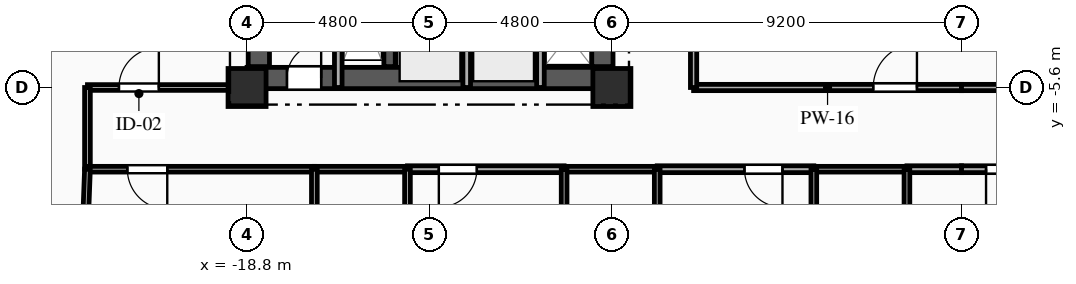
"""IFC4 building model, lengths in metres.
Left out: names, types, materials, properties, quantities, classifications, styles, units other than length and angle.
Written with IfcOpenShell. Run it as: python <this file> out.ifc"""

import sys

from ifc_helpers import new_model, si_unit, direction, frame, frame_2d, origin, origin_2d, place, context, subcontext, project, spatial, rectangle, extrude, element, fill, save


model = new_model("IFC4")
c1 = context("Model", 3, precision=1e-05, world=origin(), true_north=direction((0.0, 1.0)))
c2 = subcontext(c1, "Body", "Model", "MODEL_VIEW")
j1 = project(units=[si_unit("LENGTHUNIT", "METRE"), si_unit("PLANEANGLEUNIT", "RADIAN")], contexts=[c1])
p1 = place(None, origin())
s1 = spatial("IfcSite", under=j1, at=p1, CompositionType="ELEMENT")
p2 = place(p1, origin())
s2 = spatial("IfcBuilding", under=s1, at=p2, CompositionType="ELEMENT")
p3 = place(p2, frame((0.0, 0.0, 115.85)))
s3 = spatial("IfcBuildingStorey", under=s2, at=p3, CompositionType="ELEMENT", Elevation=115.85)
for number, where, z_axis, x_axis in (
    (1, (-18.8, -5.6, 0.0), (0.0, 0.0, 1.0), (1.0, 0.0, 0.0)),
    (2, (-9.2, -5.6, 0.0), (0.0, 0.0, 1.0), (1.0, 0.0, 0.0)),
):
    element("IfcColumn", number, at=place(p3, frame(where, z_axis=z_axis, x_axis=x_axis)), inside=s3, PredefinedType="COLUMN", context=c2, shape_type="SweptSolid", body=[
        extrude(rectangle(XDim=1.0, YDim=1.0, at=origin_2d()), origin(), (0.0, 0.0, 1.0), 3.35),
    ])
p4 = place(p3, frame((-18.8, -5.35, 0.0), z_axis=(0.0, 0.0, 1.0), x_axis=(1.0, 0.0, 0.0)))
e3 = element("IfcWall", 3, at=p4, inside=s3, PredefinedType="SHEAR", context=c2, shape_type="SweptSolid", body=[
    extrude(rectangle(XDim=9.6, YDim=0.56, at=frame_2d((4.8, 0.0))), origin(), (0.0, 0.0, 1.0), 3.045),
])
p5 = place(p4, frame((1.05, 0.0, 0.0)))
e4 = element("IfcOpeningElement", 4, at=p5, cuts=e3, PredefinedType="OPENING", context=c2, shape_type="SweptSolid", body=[
    extrude(rectangle(XDim=0.9, YDim=2.1, at=frame_2d((0.45, 1.05))), frame((0.0, 0.29, 0.0), z_axis=(0.0, -1.0, 0.0), x_axis=(1.0, 0.0, 0.0)), (0.0, 0.0, 1.0), 0.58),
])
p6 = place(p3, frame((-18.49, -5.05, 0.0), z_axis=(0.0, 0.0, 1.0), x_axis=(0.0, 1.0, 0.0)))
e5 = element("IfcWall", 5, at=p6, inside=s3, PredefinedType="SHEAR", context=c2, shape_type="SweptSolid", body=[
    extrude(rectangle(XDim=10.1, YDim=0.56, at=frame_2d((5.05, 0.0))), origin(), (0.0, 0.0, 1.0), 3.045),
])
p7 = place(p3, frame((-9.45, -5.05, 0.0), z_axis=(0.0, 0.0, 1.0), x_axis=(0.0, 1.0, 0.0)))
e6 = element("IfcWall", 6, at=p7, inside=s3, PredefinedType="SHEAR", context=c2, shape_type="SweptSolid", body=[
    extrude(rectangle(XDim=10.1, YDim=0.56, at=frame_2d((5.05, 0.0))), origin(), (0.0, 0.0, 1.0), 3.045),
])
p8 = place(p7, frame((7.15, 0.0, 0.0)))
e7 = element("IfcOpeningElement", 7, at=p8, cuts=e6, PredefinedType="OPENING", context=c2, shape_type="SweptSolid", body=[
    extrude(rectangle(XDim=0.9, YDim=2.1, at=frame_2d((0.45, 1.05))), frame((0.0, 0.29, 0.0), z_axis=(0.0, -1.0, 0.0), x_axis=(1.0, 0.0, 0.0)), (0.0, 0.0, 1.0), 0.58),
])
p9 = place(p7, frame((2.4, 0.0, 0.0)))
e8 = element("IfcOpeningElement", 8, at=p9, cuts=e6, PredefinedType="OPENING", context=c2, shape_type="SweptSolid", body=[
    extrude(rectangle(XDim=1.2, YDim=2.15, at=frame_2d((0.6, 1.075))), frame((0.0, 0.29, 0.0), z_axis=(0.0, -1.0, 0.0), x_axis=(1.0, 0.0, 0.0)), (0.0, 0.0, 1.0), 0.58),
])
p10 = place(p3, frame((-15.05, -5.05, 0.0), z_axis=(0.0, 0.0, 1.0), x_axis=(0.0, 1.0, 0.0)))
e9 = element("IfcWall", 9, at=p10, inside=s3, PredefinedType="SHEAR", context=c2, shape_type="SweptSolid", body=[
    extrude(rectangle(XDim=10.1, YDim=0.3, at=frame_2d((5.05, 0.0))), origin(), (0.0, 0.0, 1.0), 3.045),
])
p11 = place(p3, frame((-16.4, -5.6, 0.0), z_axis=(0.0, 0.0, 1.0), x_axis=(0.0, 1.0, 0.0)))
e10 = element("IfcWall", 10, at=p11, inside=s3, PredefinedType="PARTITIONING", context=c2, shape_type="SweptSolid", body=[
    extrude(rectangle(XDim=3.49, YDim=0.2, at=frame_2d((1.745, 0.0))), origin(), (0.0, 0.0, 1.0), 3.045),
])
for number, where, z_axis, x_axis in (
    (11, (-13.02, -5.6, 0.0), (0.0, 0.0, 1.0), (0.0, 1.0, 0.0)),
    (12, (-11.08, -5.6, 0.0), (0.0, 0.0, 1.0), (0.0, 1.0, 0.0)),
):
    element("IfcWall", number, at=place(p3, frame(where, z_axis=z_axis, x_axis=x_axis)), inside=s3, PredefinedType="PARTITIONING", context=c2, shape_type="SweptSolid", body=[
        extrude(rectangle(XDim=2.25, YDim=0.2, at=frame_2d((1.125, 0.0))), origin(), (0.0, 0.0, 1.0), 3.045),
    ])
p12 = place(p3, frame((-23.0, -5.6, 0.0), z_axis=(0.0, 0.0, 1.0), x_axis=(1.0, 0.0, 0.0)))
e13 = element("IfcWall", 13, at=p12, inside=s3, PredefinedType="PARTITIONING", context=c2, shape_type="SweptSolid", body=[
    extrude(rectangle(XDim=4.2, YDim=0.15, at=frame_2d((2.1, 0.0))), origin(), (0.0, 0.0, 1.0), 3.045),
])
p13 = place(p12, frame((0.829, 0.0, 0.0)))
e14 = element("IfcOpeningElement", 14, at=p13, cuts=e13, PredefinedType="OPENING", context=c2, shape_type="SweptSolid", body=[
    extrude(rectangle(XDim=1.05, YDim=2.15, at=frame_2d((0.525, 1.075))), frame((0.0, 0.085, 0.0), z_axis=(0.0, -1.0, 0.0), x_axis=(1.0, 0.0, 0.0)), (0.0, 0.0, 1.0), 0.17),
])
p14 = place(p3, frame((-23.0, -7.75, 0.0), z_axis=(0.0, 0.0, 1.0), x_axis=(0.0, 1.0, 0.0)))
e15 = element("IfcWall", 15, at=p14, inside=s3, PredefinedType="PARTITIONING", context=c2, shape_type="SweptSolid", body=[
    extrude(rectangle(XDim=2.15, YDim=0.15, at=frame_2d((1.075, 0.0))), origin(), (0.0, 0.0, 1.0), 2.7),
])
p15 = place(p3, frame((-17.029, -7.75, 0.0), z_axis=(0.0, 0.0, 1.0), x_axis=(-1.0, 0.0, 0.0)))
e16 = element("IfcWall", 16, at=p15, inside=s3, PredefinedType="PARTITIONING", context=c2, shape_type="SweptSolid", body=[
    extrude(rectangle(XDim=5.971, YDim=0.15, at=frame_2d((2.985, 0.0))), origin(), (0.0, 0.0, 1.0), 3.045),
])
p16 = place(p15, frame((3.871, 0.0, 0.0)))
e17 = element("IfcOpeningElement", 17, at=p16, cuts=e16, PredefinedType="OPENING", context=c2, shape_type="SweptSolid", body=[
    extrude(rectangle(XDim=1.05, YDim=2.15, at=frame_2d((0.525, 1.075))), frame((0.0, 0.085, 0.0), z_axis=(0.0, -1.0, 0.0), x_axis=(1.0, 0.0, 0.0)), (0.0, 0.0, 1.0), 0.17),
])
p17 = place(p3, frame((-10.457, -7.75, 0.0), z_axis=(0.0, 0.0, 1.0), x_axis=(-1.0, 0.0, 0.0)))
e18 = element("IfcWall", 18, at=p17, inside=s3, PredefinedType="PARTITIONING", context=c2, shape_type="SweptSolid", body=[
    extrude(rectangle(XDim=4.122, YDim=0.18, at=frame_2d((2.061, 0.0))), origin(), (0.0, 0.0, 1.0), 3.045),
])
p18 = place(p17, frame((2.297, 0.0, 0.0)))
e19 = element("IfcOpeningElement", 19, at=p18, cuts=e18, PredefinedType="OPENING", context=c2, shape_type="SweptSolid", body=[
    extrude(rectangle(XDim=1.0, YDim=2.15, at=frame_2d((0.5, 1.075))), frame((0.0, 0.1, 0.0), z_axis=(0.0, -1.0, 0.0), x_axis=(1.0, 0.0, 0.0)), (0.0, 0.0, 1.0), 0.2),
])
p19 = place(p3, frame((-14.579, -7.75, 0.0), z_axis=(0.0, 0.0, 1.0), x_axis=(-1.0, 0.0, 0.0)))
e20 = element("IfcWall", 20, at=p19, inside=s3, PredefinedType="PLUMBINGWALL", context=c2, shape_type="SweptSolid", body=[
    extrude(rectangle(XDim=2.45, YDim=0.15, at=frame_2d((1.225, 0.0))), origin(), (0.0, 0.0, 1.0), 3.045),
])
p20 = place(p3, frame((-3.886, -7.75, 0.0), z_axis=(0.0, 0.0, 1.0), x_axis=(-1.0, 0.0, 0.0)))
e21 = element("IfcWall", 21, at=p20, inside=s3, PredefinedType="PARTITIONING", context=c2, shape_type="SweptSolid", body=[
    extrude(rectangle(XDim=4.121, YDim=0.18, at=frame_2d((2.061, 0.0))), origin(), (0.0, 0.0, 1.0), 3.045),
])
p21 = place(p20, frame((0.825, 0.0, 0.0)))
e22 = element("IfcOpeningElement", 22, at=p21, cuts=e21, PredefinedType="OPENING", context=c2, shape_type="SweptSolid", body=[
    extrude(rectangle(XDim=1.0, YDim=2.15, at=frame_2d((0.5, 1.075))), frame((0.0, 0.1, 0.0), z_axis=(0.0, -1.0, 0.0), x_axis=(1.0, 0.0, 0.0)), (0.0, 0.0, 1.0), 0.2),
])
p22 = place(p3, frame((-8.007, -7.75, 0.0), z_axis=(0.0, 0.0, 1.0), x_axis=(-1.0, 0.0, 0.0)))
e23 = element("IfcWall", 23, at=p22, inside=s3, PredefinedType="PLUMBINGWALL", context=c2, shape_type="SweptSolid", body=[
    extrude(rectangle(XDim=2.45, YDim=0.15, at=frame_2d((1.225, 0.0))), origin(), (0.0, 0.0, 1.0), 3.045),
])
p23 = place(p3, frame((0.0, -7.75, 0.0), z_axis=(0.0, 0.0, 1.0), x_axis=(-1.0, 0.0, 0.0)))
e24 = element("IfcWall", 24, at=p23, inside=s3, PredefinedType="PARTITIONING", context=c2, shape_type="SweptSolid", body=[
    extrude(rectangle(XDim=1.436, YDim=0.18, at=frame_2d((0.718, 0.0))), origin(), (0.0, 0.0, 1.0), 3.045),
])
p24 = place(p3, frame((-1.436, -7.75, 0.0), z_axis=(0.0, 0.0, 1.0), x_axis=(-1.0, 0.0, 0.0)))
e25 = element("IfcWall", 25, at=p24, inside=s3, PredefinedType="PLUMBINGWALL", context=c2, shape_type="SweptSolid", body=[
    extrude(rectangle(XDim=2.45, YDim=0.15, at=frame_2d((1.225, 0.0))), origin(), (0.0, 0.0, 1.0), 3.045),
])
p25 = place(p3, frame((-7.05, -5.6, 0.0), z_axis=(0.0, 0.0, 1.0), x_axis=(1.0, 0.0, 0.0)))
e26 = element("IfcWall", 26, at=p25, inside=s3, PredefinedType="PARTITIONING", context=c2, shape_type="SweptSolid", body=[
    extrude(rectangle(XDim=7.05, YDim=0.165, at=frame_2d((3.525, 0.0))), origin(), (0.0, 0.0, 1.0), 2.53),
])
p26 = place(p25, frame((4.728, 0.0, 0.0)))
e27 = element("IfcOpeningElement", 27, at=p26, cuts=e26, PredefinedType="OPENING", context=c2, shape_type="SweptSolid", body=[
    extrude(rectangle(XDim=1.15, YDim=2.15, at=frame_2d((0.575, 1.075))), frame((0.0, 0.093, 0.0), z_axis=(0.0, -1.0, 0.0), x_axis=(1.0, 0.0, 0.0)), (0.0, 0.0, 1.0), 0.185),
])
p27 = place(p3, frame((2.686, -7.75, 0.0), z_axis=(0.0, 0.0, 1.0), x_axis=(-1.0, 0.0, 0.0)))
e28 = element("IfcWall", 28, at=p27, inside=s3, PredefinedType="PARTITIONING", context=c2, shape_type="SweptSolid", body=[
    extrude(rectangle(XDim=2.686, YDim=0.18, at=frame_2d((1.343, 0.0))), origin(), (0.0, 0.0, 1.0), 3.045),
])
p28 = place(p27, frame((1.04, 0.0, 0.0)))
e29 = element("IfcOpeningElement", 29, at=p28, cuts=e28, PredefinedType="OPENING", context=c2, shape_type="SweptSolid", body=[
    extrude(rectangle(XDim=1.0, YDim=2.15, at=frame_2d((0.5, 1.075))), frame((0.0, 0.1, 0.0), z_axis=(0.0, -1.0, 0.0), x_axis=(1.0, 0.0, 0.0)), (0.0, 0.0, 1.0), 0.2),
])
p29 = place(p3, frame((0.0, -5.6, 0.0), z_axis=(0.0, 0.0, 1.0), x_axis=(1.0, 0.0, 0.0)))
e30 = element("IfcWall", 30, at=p29, inside=s3, PredefinedType="PARTITIONING", context=c2, shape_type="SweptSolid", body=[
    extrude(rectangle(XDim=7.05, YDim=0.165, at=frame_2d((3.525, 0.0))), origin(), (0.0, 0.0, 1.0), 2.53),
])
p30 = place(p3, frame((-7.05, 1.45, 0.0), z_axis=(0.0, 0.0, 1.0), x_axis=(0.0, -1.0, 0.0)))
e31 = element("IfcWall", 31, at=p30, inside=s3, PredefinedType="PARTITIONING", context=c2, shape_type="SweptSolid", body=[
    extrude(rectangle(XDim=7.05, YDim=0.165, at=frame_2d((3.525, 0.0))), origin(), (0.0, 0.0, 1.0), 3.045),
])
p31 = place(p3, frame((-23.0, -7.75, 0.0), z_axis=(0.0, 0.0, 1.0), x_axis=(-0.036924695214, -0.999318050914, 0.0)))
e32 = element("IfcWall", 32, at=p31, inside=s3, PredefinedType="PARTITIONING", context=c2, shape_type="SweptSolid", body=[
    extrude(rectangle(XDim=10.176, YDim=0.15, at=frame_2d((5.088, 0.0))), origin(), (0.0, 0.0, 1.0), 3.045),
])
for number, where, z_axis, x_axis in (
    (33, (-17.029, -7.75, 0.0), (0.0, 0.0, 1.0), (0.0, -1.0, 0.0)),
    (34, (-14.579, -9.9, 0.0), (0.0, 0.0, 1.0), (0.0, 1.0, 0.0)),
    (35, (-10.457, -7.75, 0.0), (0.0, 0.0, 1.0), (0.0, -1.0, 0.0)),
    (36, (-8.007, -9.9, 0.0), (0.0, 0.0, 1.0), (0.0, 1.0, 0.0)),
    (37, (-3.886, -7.75, 0.0), (0.0, 0.0, 1.0), (0.0, -1.0, 0.0)),
    (38, (-1.436, -9.9, 0.0), (0.0, 0.0, 1.0), (0.0, 1.0, 0.0)),
):
    element("IfcWall", number, at=place(p3, frame(where, z_axis=z_axis, x_axis=x_axis)), inside=s3, PredefinedType="PLUMBINGWALL", context=c2, shape_type="SweptSolid", body=[
        extrude(rectangle(XDim=2.15, YDim=0.15, at=frame_2d((1.075, 0.0))), origin(), (0.0, 0.0, 1.0), 3.045),
    ])
p32 = place(p5, origin())
e39 = element("IfcDoor", 39, at=p32, inside=s3, OperationType="SINGLE_SWING_RIGHT", PredefinedType="DOOR", context=c2, shape_type="SweptSolid", body=[
    extrude(rectangle(XDim=0.9, YDim=2.1, at=frame_2d((0.45, 1.05))), frame((0.0, 0.025, 0.0), z_axis=(0.0, -1.0, 0.0), x_axis=(1.0, 0.0, 0.0)), (0.0, 0.0, 1.0), 0.05),
])
fill(e4, e39)
p33 = place(p13, origin())
e40 = element("IfcDoor", 40, at=p33, inside=s3, OperationType="SINGLE_SWING_RIGHT", PredefinedType="DOOR", context=c2, shape_type="SweptSolid", body=[
    extrude(rectangle(XDim=1.05, YDim=2.15, at=frame_2d((0.525, 1.075))), frame((0.0, 0.025, 0.0), z_axis=(0.0, -1.0, 0.0), x_axis=(1.0, 0.0, 0.0)), (0.0, 0.0, 1.0), 0.05),
])
fill(e14, e40)
p34 = place(p16, origin())
e41 = element("IfcDoor", 41, at=p34, inside=s3, OperationType="SINGLE_SWING_LEFT", PredefinedType="DOOR", context=c2, shape_type="SweptSolid", body=[
    extrude(rectangle(XDim=1.05, YDim=2.15, at=frame_2d((0.525, 1.075))), frame((0.0, 0.025, 0.0), z_axis=(0.0, -1.0, 0.0), x_axis=(1.0, 0.0, 0.0)), (0.0, 0.0, 1.0), 0.05),
])
fill(e17, e41)
p35 = place(p18, origin())
e42 = element("IfcDoor", 42, at=p35, inside=s3, OperationType="SINGLE_SWING_RIGHT", PredefinedType="DOOR", context=c2, shape_type="SweptSolid", body=[
    extrude(rectangle(XDim=1.0, YDim=2.15, at=frame_2d((0.5, 1.075))), frame((0.0, 0.025, 0.0), z_axis=(0.0, -1.0, 0.0), x_axis=(1.0, 0.0, 0.0)), (0.0, 0.0, 1.0), 0.05),
])
fill(e19, e42)
p36 = place(p21, origin())
e43 = element("IfcDoor", 43, at=p36, inside=s3, OperationType="SINGLE_SWING_LEFT", PredefinedType="DOOR", context=c2, shape_type="SweptSolid", body=[
    extrude(rectangle(XDim=1.0, YDim=2.15, at=frame_2d((0.5, 1.075))), frame((0.0, 0.025, 0.0), z_axis=(0.0, -1.0, 0.0), x_axis=(1.0, 0.0, 0.0)), (0.0, 0.0, 1.0), 0.05),
])
fill(e22, e43)
p37 = place(p26, origin())
e44 = element("IfcDoor", 44, at=p37, inside=s3, OperationType="SINGLE_SWING_RIGHT", PredefinedType="DOOR", context=c2, shape_type="SweptSolid", body=[
    extrude(rectangle(XDim=1.15, YDim=2.15, at=frame_2d((0.575, 1.075))), frame((0.0, 0.025, 0.0), z_axis=(0.0, -1.0, 0.0), x_axis=(1.0, 0.0, 0.0)), (0.0, 0.0, 1.0), 0.05),
])
fill(e27, e44)
p38 = place(p28, origin())
e45 = element("IfcDoor", 45, at=p38, inside=s3, OperationType="SINGLE_SWING_RIGHT", PredefinedType="DOOR", context=c2, shape_type="SweptSolid", body=[
    extrude(rectangle(XDim=1.0, YDim=2.15, at=frame_2d((0.5, 1.075))), frame((0.0, 0.025, 0.0), z_axis=(0.0, -1.0, 0.0), x_axis=(1.0, 0.0, 0.0)), (0.0, 0.0, 1.0), 0.05),
])
fill(e29, e45)
save(model, sys.argv[1])
